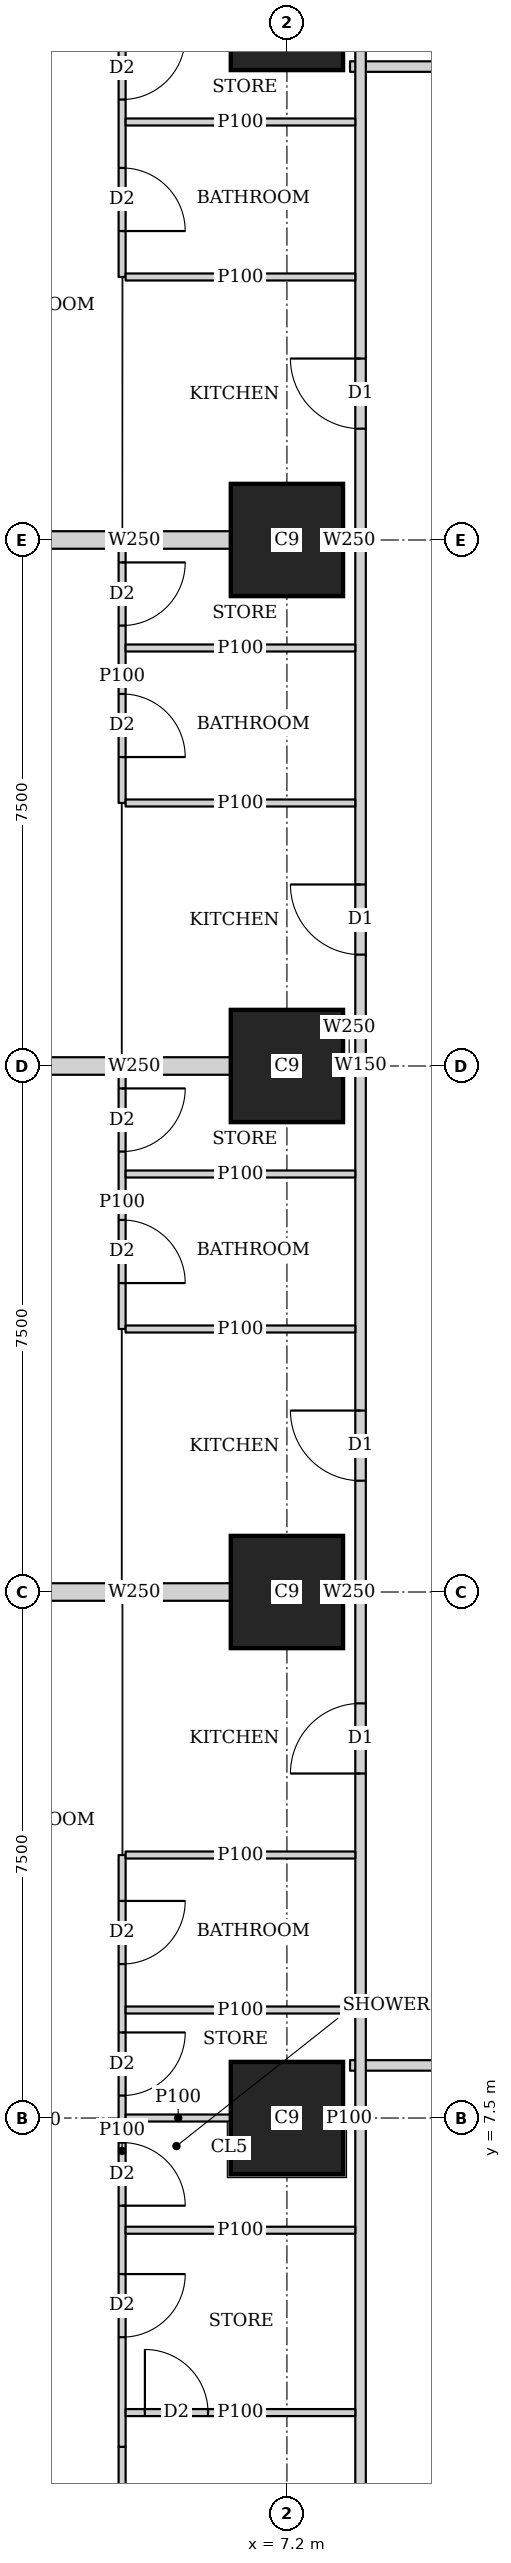
"""IFC4 building model, lengths in metres.
Left out: names, types, materials, properties, quantities, classifications, styles, units other than length and angle.
Written with IfcOpenShell. Run it as: python <this file> out.ifc"""

import sys

from ifc_helpers import new_model, si_unit, direction, frame, frame_2d, origin, origin_2d, place, context, subcontext, project, spatial, rectangle, extrude, element, fill, save


model = new_model("IFC4")
c1 = context("Model", 3, precision=1e-05, world=origin(), true_north=direction((0.0, 1.0)))
c2 = subcontext(c1, "Body", "Model", "MODEL_VIEW")
j1 = project(units=[si_unit("LENGTHUNIT", "METRE"), si_unit("PLANEANGLEUNIT", "RADIAN")], contexts=[c1])
p1 = place(None, origin())
s1 = spatial("IfcSite", under=j1, at=p1, CompositionType="ELEMENT")
p2 = place(p1, origin())
s2 = spatial("IfcBuilding", under=s1, at=p2, CompositionType="ELEMENT")
p3 = place(p2, frame((0.0, 0.0, 122.9)))
s3 = spatial("IfcBuildingStorey", under=s2, at=p3, CompositionType="ELEMENT", Elevation=122.9)
for number, where, z_axis, x_axis in (
    (1, (7.2, 7.5, 0.0), (0.0, 0.0, 1.0), (1.0, 0.0, 0.0)),
    (2, (7.2, 15.0, 0.0), (0.0, 0.0, 1.0), (1.0, 0.0, 0.0)),
    (3, (7.2, 22.5, 0.0), (0.0, 0.0, 1.0), (1.0, 0.0, 0.0)),
    (4, (7.2, 30.0, 0.0), (0.0, 0.0, 1.0), (1.0, 0.0, 0.0)),
    (5, (7.2, 37.5, 0.0), (0.0, 0.0, 1.0), (1.0, 0.0, 0.0)),
):
    element("IfcColumn", number, at=place(p3, frame(where, z_axis=z_axis, x_axis=x_axis)), inside=s3, PredefinedType="COLUMN", context=c2, shape_type="SweptSolid", body=[
        extrude(rectangle(XDim=1.6, YDim=1.6, at=origin_2d()), origin(), (0.0, 0.0, 1.0), 3.75),
    ])
p4 = place(p3, frame((8.25, 2.126, 0.0), z_axis=(0.0, 0.0, 1.0), x_axis=(0.0, 1.0, 0.0)))
e6 = element("IfcWall", 6, at=p4, inside=s3, PredefinedType="SOLIDWALL", context=c2, shape_type="SweptSolid", body=[
    extrude(rectangle(XDim=40.773, YDim=0.15, at=frame_2d((20.386, 0.0))), origin(), (0.0, 0.0, 1.0), 3.5),
])
p5 = place(p4, frame((10.286, 0.0, 0.0)))
e7 = element("IfcOpeningElement", 7, at=p5, cuts=e6, PredefinedType="OPENING", context=c2, shape_type="SweptSolid", body=[
    extrude(rectangle(XDim=1.0, YDim=2.1, at=frame_2d((0.5, 1.05))), frame((0.0, 0.085, 0.0), z_axis=(0.0, -1.0, 0.0), x_axis=(1.0, 0.0, 0.0)), (0.0, 0.0, 1.0), 0.17),
])
p6 = place(p4, frame((14.461, 0.0, 0.0)))
e8 = element("IfcOpeningElement", 8, at=p6, cuts=e6, PredefinedType="OPENING", context=c2, shape_type="SweptSolid", body=[
    extrude(rectangle(XDim=1.0, YDim=2.1, at=frame_2d((0.5, 1.05))), frame((0.0, 0.085, 0.0), z_axis=(0.0, -1.0, 0.0), x_axis=(1.0, 0.0, 0.0)), (0.0, 0.0, 1.0), 0.17),
])
p7 = place(p4, frame((21.962, 0.0, 0.0)))
e9 = element("IfcOpeningElement", 9, at=p7, cuts=e6, PredefinedType="OPENING", context=c2, shape_type="SweptSolid", body=[
    extrude(rectangle(XDim=1.0, YDim=2.1, at=frame_2d((0.5, 1.05))), frame((0.0, 0.085, 0.0), z_axis=(0.0, -1.0, 0.0), x_axis=(1.0, 0.0, 0.0)), (0.0, 0.0, 1.0), 0.17),
])
p8 = place(p4, frame((29.461, 0.0, 0.0)))
e10 = element("IfcOpeningElement", 10, at=p8, cuts=e6, PredefinedType="OPENING", context=c2, shape_type="SweptSolid", body=[
    extrude(rectangle(XDim=1.0, YDim=2.1, at=frame_2d((0.5, 1.05))), frame((0.0, 0.085, 0.0), z_axis=(0.0, -1.0, 0.0), x_axis=(1.0, 0.0, 0.0)), (0.0, 0.0, 1.0), 0.17),
])
p9 = place(p3, frame((13.599, 8.25, 0.0), z_axis=(0.0, 0.0, 1.0), x_axis=(-1.0, 0.0, 0.0)))
e11 = element("IfcWall", 11, at=p9, inside=s3, PredefinedType="SOLIDWALL", context=c2, shape_type="SweptSolid", body=[
    extrude(rectangle(XDim=5.499, YDim=0.15, at=frame_2d((2.75, 0.0))), origin(), (0.0, 0.0, 1.0), 3.5),
])
p10 = place(p9, frame((1.774, 0.0, 0.0)))
e12 = element("IfcOpeningElement", 12, at=p10, cuts=e11, PredefinedType="OPENING", context=c2, shape_type="SweptSolid", body=[
    extrude(rectangle(XDim=1.0, YDim=2.1, at=frame_2d((0.5, 1.05))), frame((0.0, 0.085, 0.0), z_axis=(0.0, -1.0, 0.0), x_axis=(1.0, 0.0, 0.0)), (0.0, 0.0, 1.0), 0.17),
])
p11 = place(p3, frame((8.1, 36.75, 0.0), z_axis=(0.0, 0.0, 1.0), x_axis=(1.0, 0.0, 0.0)))
e13 = element("IfcWall", 13, at=p11, inside=s3, PredefinedType="SOLIDWALL", context=c2, shape_type="SweptSolid", body=[
    extrude(rectangle(XDim=5.499, YDim=0.15, at=frame_2d((2.75, 0.0))), origin(), (0.0, 0.0, 1.0), 3.5),
])
p12 = place(p11, frame((2.725, 0.0, 0.0)))
e14 = element("IfcOpeningElement", 14, at=p12, cuts=e13, PredefinedType="OPENING", context=c2, shape_type="SweptSolid", body=[
    extrude(rectangle(XDim=1.0, YDim=2.1, at=frame_2d((0.5, 1.05))), frame((0.0, 0.085, 0.0), z_axis=(0.0, -1.0, 0.0), x_axis=(1.0, 0.0, 0.0)), (0.0, 0.0, 1.0), 0.17),
])
p13 = place(p3, frame((4.85, 0.326, 0.0), z_axis=(0.0, 0.0, 1.0), x_axis=(0.0, 1.0, 0.0)))
e15 = element("IfcWall", 15, at=p13, inside=s3, PredefinedType="PARTITIONING", context=c2, shape_type="SweptSolid", body=[
    extrude(rectangle(XDim=2.486, YDim=0.1, at=frame_2d((1.243, 0.0))), origin(), (0.0, 0.0, 1.0), 2.05),
])
p14 = place(p3, frame((4.85, 2.812, 0.0), z_axis=(0.0, 0.0, 1.0), x_axis=(0.0, 1.0, 0.0)))
e16 = element("IfcWall", 16, at=p14, inside=s3, PredefinedType="PARTITIONING", context=c2, shape_type="SweptSolid", body=[
    extrude(rectangle(XDim=8.438, YDim=0.1, at=frame_2d((4.219, 0.0))), origin(), (0.0, 0.0, 1.0), 3.5),
])
p15 = place(p14, frame((6.883, 0.0, 0.0)))
e17 = element("IfcOpeningElement", 17, at=p15, cuts=e16, PredefinedType="OPENING", context=c2, shape_type="SweptSolid", body=[
    extrude(rectangle(XDim=0.9, YDim=2.1, at=frame_2d((0.45, 1.05))), frame((0.0, 0.06, 0.0), z_axis=(0.0, -1.0, 0.0), x_axis=(1.0, 0.0, 0.0)), (0.0, 0.0, 1.0), 0.12),
])
p16 = place(p14, frame((3.438, 0.0, 0.0)))
e18 = element("IfcOpeningElement", 18, at=p16, cuts=e16, PredefinedType="OPENING", context=c2, shape_type="SweptSolid", body=[
    extrude(rectangle(XDim=0.9, YDim=2.1, at=frame_2d((0.45, 1.05))), frame((0.0, 0.06, 0.0), z_axis=(0.0, -1.0, 0.0), x_axis=(1.0, 0.0, 0.0)), (0.0, 0.0, 1.0), 0.12),
])
p17 = place(p14, frame((5.008, 0.0, 0.0)))
e19 = element("IfcOpeningElement", 19, at=p17, cuts=e16, PredefinedType="OPENING", context=c2, shape_type="SweptSolid", body=[
    extrude(rectangle(XDim=0.9, YDim=2.1, at=frame_2d((0.45, 1.05))), frame((0.0, 0.06, 0.0), z_axis=(0.0, -1.0, 0.0), x_axis=(1.0, 0.0, 0.0)), (0.0, 0.0, 1.0), 0.12),
])
p18 = place(p14, frame((1.563, 0.0, 0.0)))
e20 = element("IfcOpeningElement", 20, at=p18, cuts=e16, PredefinedType="OPENING", context=c2, shape_type="SweptSolid", body=[
    extrude(rectangle(XDim=0.9, YDim=2.1, at=frame_2d((0.45, 1.05))), frame((0.0, 0.06, 0.0), z_axis=(0.0, -1.0, 0.0), x_axis=(1.0, 0.0, 0.0)), (0.0, 0.0, 1.0), 0.12),
])
p19 = place(p3, frame((4.9, 7.5, 0.0), z_axis=(0.0, 0.0, 1.0), x_axis=(1.0, 0.0, 0.0)))
e21 = element("IfcWall", 21, at=p19, inside=s3, PredefinedType="PARTITIONING", context=c2, shape_type="SweptSolid", body=[
    extrude(rectangle(XDim=1.499, YDim=0.1, at=frame_2d((0.75, 0.0))), origin(), (0.0, 0.0, 1.0), 3.5),
])
p20 = place(p3, frame((8.001, 7.5, 0.0), z_axis=(0.0, 0.0, 1.0), x_axis=(1.0, 0.0, 0.0)))
e22 = element("IfcWall", 22, at=p20, inside=s3, PredefinedType="PARTITIONING", context=c2, shape_type="SweptSolid", body=[
    extrude(rectangle(XDim=0.174, YDim=0.1, at=frame_2d((0.087, 0.0))), origin(), (0.0, 0.0, 1.0), 3.5),
])
for number, where, z_axis, x_axis in (
    (23, (4.9, 11.25, 0.0), (0.0, 0.0, 1.0), (1.0, 0.0, 0.0)),
    (24, (4.9, 9.04, 0.0), (0.0, 0.0, 1.0), (1.0, 0.0, 0.0)),
    (25, (4.9, 5.9, 0.0), (0.0, 0.0, 1.0), (1.0, 0.0, 0.0)),
):
    element("IfcWall", number, at=place(p3, frame(where, z_axis=z_axis, x_axis=x_axis)), inside=s3, PredefinedType="PARTITIONING", context=c2, shape_type="SweptSolid", body=[
        extrude(rectangle(XDim=3.275, YDim=0.1, at=frame_2d((1.638, 0.0))), origin(), (0.0, 0.0, 1.0), 3.5),
    ])
p21 = place(p3, frame((4.85, 18.75, 0.0), z_axis=(0.0, 0.0, 1.0), x_axis=(0.0, 1.0, 0.0)))
e26 = element("IfcWall", 26, at=p21, inside=s3, PredefinedType="PARTITIONING", context=c2, shape_type="SweptSolid", body=[
    extrude(rectangle(XDim=3.625, YDim=0.1, at=frame_2d((1.812, 0.0))), origin(), (0.0, 0.0, 1.0), 3.5),
])
p22 = place(p21, frame((0.655, 0.0, 0.0)))
e27 = element("IfcOpeningElement", 27, at=p22, cuts=e26, PredefinedType="OPENING", context=c2, shape_type="SweptSolid", body=[
    extrude(rectangle(XDim=0.9, YDim=2.1, at=frame_2d((0.45, 1.05))), frame((0.0, 0.06, 0.0), z_axis=(0.0, -1.0, 0.0), x_axis=(1.0, 0.0, 0.0)), (0.0, 0.0, 1.0), 0.12),
])
p23 = place(p21, frame((2.53, 0.0, 0.0)))
e28 = element("IfcOpeningElement", 28, at=p23, cuts=e26, PredefinedType="OPENING", context=c2, shape_type="SweptSolid", body=[
    extrude(rectangle(XDim=0.9, YDim=2.1, at=frame_2d((0.45, 1.05))), frame((0.0, 0.06, 0.0), z_axis=(0.0, -1.0, 0.0), x_axis=(1.0, 0.0, 0.0)), (0.0, 0.0, 1.0), 0.12),
])
for number, where, z_axis, x_axis in (
    (29, (4.9, 18.75, 0.0), (0.0, 0.0, 1.0), (1.0, 0.0, 0.0)),
    (30, (4.9, 20.96, 0.0), (0.0, 0.0, 1.0), (1.0, 0.0, 0.0)),
):
    element("IfcWall", number, at=place(p3, frame(where, z_axis=z_axis, x_axis=x_axis)), inside=s3, PredefinedType="PARTITIONING", context=c2, shape_type="SweptSolid", body=[
        extrude(rectangle(XDim=3.275, YDim=0.1, at=frame_2d((1.638, 0.0))), origin(), (0.0, 0.0, 1.0), 3.5),
    ])
p24 = place(p3, frame((3.65, 15.0, 0.0), z_axis=(0.0, 0.0, 1.0), x_axis=(1.0, 0.0, 0.0)))
e31 = element("IfcWall", 31, at=p24, inside=s3, PredefinedType="SOLIDWALL", context=c2, shape_type="SweptSolid", body=[
    extrude(rectangle(XDim=2.749, YDim=0.25, at=frame_2d((1.375, 0.0))), origin(), (0.0, 0.0, 1.0), 3.5),
])
p25 = place(p3, frame((8.001, 15.0, 0.0), z_axis=(0.0, 0.0, 1.0), x_axis=(1.0, 0.0, 0.0)))
e32 = element("IfcWall", 32, at=p25, inside=s3, PredefinedType="SOLIDWALL", context=c2, shape_type="SweptSolid", body=[
    extrude(rectangle(XDim=0.174, YDim=0.25, at=frame_2d((0.087, 0.0))), origin(), (0.0, 0.0, 1.0), 3.5),
])
p26 = place(p3, frame((4.85, 26.25, 0.0), z_axis=(0.0, 0.0, 1.0), x_axis=(0.0, 1.0, 0.0)))
e33 = element("IfcWall", 33, at=p26, inside=s3, PredefinedType="PARTITIONING", context=c2, shape_type="SweptSolid", body=[
    extrude(rectangle(XDim=3.625, YDim=0.1, at=frame_2d((1.812, 0.0))), origin(), (0.0, 0.0, 1.0), 3.5),
])
p27 = place(p26, frame((0.655, 0.0, 0.0)))
e34 = element("IfcOpeningElement", 34, at=p27, cuts=e33, PredefinedType="OPENING", context=c2, shape_type="SweptSolid", body=[
    extrude(rectangle(XDim=0.9, YDim=2.1, at=frame_2d((0.45, 1.05))), frame((0.0, 0.06, 0.0), z_axis=(0.0, -1.0, 0.0), x_axis=(1.0, 0.0, 0.0)), (0.0, 0.0, 1.0), 0.12),
])
p28 = place(p26, frame((2.53, 0.0, 0.0)))
e35 = element("IfcOpeningElement", 35, at=p28, cuts=e33, PredefinedType="OPENING", context=c2, shape_type="SweptSolid", body=[
    extrude(rectangle(XDim=0.9, YDim=2.1, at=frame_2d((0.45, 1.05))), frame((0.0, 0.06, 0.0), z_axis=(0.0, -1.0, 0.0), x_axis=(1.0, 0.0, 0.0)), (0.0, 0.0, 1.0), 0.12),
])
for number, where, z_axis, x_axis in (
    (36, (4.9, 26.25, 0.0), (0.0, 0.0, 1.0), (1.0, 0.0, 0.0)),
    (37, (4.9, 28.46, 0.0), (0.0, 0.0, 1.0), (1.0, 0.0, 0.0)),
):
    element("IfcWall", number, at=place(p3, frame(where, z_axis=z_axis, x_axis=x_axis)), inside=s3, PredefinedType="PARTITIONING", context=c2, shape_type="SweptSolid", body=[
        extrude(rectangle(XDim=3.275, YDim=0.1, at=frame_2d((1.638, 0.0))), origin(), (0.0, 0.0, 1.0), 3.5),
    ])
p29 = place(p3, frame((3.65, 22.5, 0.0), z_axis=(0.0, 0.0, 1.0), x_axis=(1.0, 0.0, 0.0)))
e38 = element("IfcWall", 38, at=p29, inside=s3, PredefinedType="SOLIDWALL", context=c2, shape_type="SweptSolid", body=[
    extrude(rectangle(XDim=2.749, YDim=0.25, at=frame_2d((1.375, 0.0))), origin(), (0.0, 0.0, 1.0), 3.5),
])
p30 = place(p3, frame((8.001, 22.5, 0.0), z_axis=(0.0, 0.0, 1.0), x_axis=(1.0, 0.0, 0.0)))
e39 = element("IfcWall", 39, at=p30, inside=s3, PredefinedType="SOLIDWALL", context=c2, shape_type="SweptSolid", body=[
    extrude(rectangle(XDim=0.174, YDim=0.25, at=frame_2d((0.087, 0.0))), origin(), (0.0, 0.0, 1.0), 3.5),
])
p31 = place(p3, frame((4.85, 33.75, 0.0), z_axis=(0.0, 0.0, 1.0), x_axis=(0.0, 1.0, 0.0)))
e40 = element("IfcWall", 40, at=p31, inside=s3, PredefinedType="PARTITIONING", context=c2, shape_type="SweptSolid", body=[
    extrude(rectangle(XDim=8.449, YDim=0.1, at=frame_2d((4.225, 0.0))), origin(), (0.0, 0.0, 1.0), 3.5),
])
p32 = place(p31, frame((0.655, 0.0, 0.0)))
e41 = element("IfcOpeningElement", 41, at=p32, cuts=e40, PredefinedType="OPENING", context=c2, shape_type="SweptSolid", body=[
    extrude(rectangle(XDim=0.9, YDim=2.1, at=frame_2d((0.45, 1.05))), frame((0.0, 0.06, 0.0), z_axis=(0.0, -1.0, 0.0), x_axis=(1.0, 0.0, 0.0)), (0.0, 0.0, 1.0), 0.12),
])
p33 = place(p31, frame((4.1, 0.0, 0.0)))
e42 = element("IfcOpeningElement", 42, at=p33, cuts=e40, PredefinedType="OPENING", context=c2, shape_type="SweptSolid", body=[
    extrude(rectangle(XDim=0.9, YDim=2.1, at=frame_2d((0.45, 1.05))), frame((0.0, 0.06, 0.0), z_axis=(0.0, -1.0, 0.0), x_axis=(1.0, 0.0, 0.0)), (0.0, 0.0, 1.0), 0.12),
])
p34 = place(p31, frame((2.53, 0.0, 0.0)))
e43 = element("IfcOpeningElement", 43, at=p34, cuts=e40, PredefinedType="OPENING", context=c2, shape_type="SweptSolid", body=[
    extrude(rectangle(XDim=0.9, YDim=2.1, at=frame_2d((0.45, 1.05))), frame((0.0, 0.06, 0.0), z_axis=(0.0, -1.0, 0.0), x_axis=(1.0, 0.0, 0.0)), (0.0, 0.0, 1.0), 0.12),
])
p35 = place(p31, frame((5.975, 0.0, 0.0)))
e44 = element("IfcOpeningElement", 44, at=p35, cuts=e40, PredefinedType="OPENING", context=c2, shape_type="SweptSolid", body=[
    extrude(rectangle(XDim=0.9, YDim=2.1, at=frame_2d((0.45, 1.05))), frame((0.0, 0.06, 0.0), z_axis=(0.0, -1.0, 0.0), x_axis=(1.0, 0.0, 0.0)), (0.0, 0.0, 1.0), 0.12),
])
for number, where, z_axis, x_axis in (
    (45, (4.9, 33.75, 0.0), (0.0, 0.0, 1.0), (1.0, 0.0, 0.0)),
    (46, (4.9, 35.96, 0.0), (0.0, 0.0, 1.0), (1.0, 0.0, 0.0)),
):
    element("IfcWall", number, at=place(p3, frame(where, z_axis=z_axis, x_axis=x_axis)), inside=s3, PredefinedType="PARTITIONING", context=c2, shape_type="SweptSolid", body=[
        extrude(rectangle(XDim=3.275, YDim=0.1, at=frame_2d((1.638, 0.0))), origin(), (0.0, 0.0, 1.0), 3.5),
    ])
p36 = place(p3, frame((3.65, 30.0, 0.0), z_axis=(0.0, 0.0, 1.0), x_axis=(1.0, 0.0, 0.0)))
e47 = element("IfcWall", 47, at=p36, inside=s3, PredefinedType="SOLIDWALL", context=c2, shape_type="SweptSolid", body=[
    extrude(rectangle(XDim=2.749, YDim=0.25, at=frame_2d((1.375, 0.0))), origin(), (0.0, 0.0, 1.0), 3.5),
])
p37 = place(p3, frame((8.001, 30.0, 0.0), z_axis=(0.0, 0.0, 1.0), x_axis=(1.0, 0.0, 0.0)))
e48 = element("IfcWall", 48, at=p37, inside=s3, PredefinedType="SOLIDWALL", context=c2, shape_type="SweptSolid", body=[
    extrude(rectangle(XDim=0.174, YDim=0.25, at=frame_2d((0.087, 0.0))), origin(), (0.0, 0.0, 1.0), 3.5),
])
p38 = place(p3, frame((8.175, 3.3, 0.0), z_axis=(0.0, 0.0, 1.0), x_axis=(-1.0, 0.0, 0.0)))
e49 = element("IfcWall", 49, at=p38, inside=s3, PredefinedType="PARTITIONING", context=c2, shape_type="SweptSolid", body=[
    extrude(rectangle(XDim=3.275, YDim=0.1, at=frame_2d((1.638, 0.0))), origin(), (0.0, 0.0, 1.0), 3.5),
])
p39 = place(p38, frame((2.1, 0.0, 0.0)))
e50 = element("IfcOpeningElement", 50, at=p39, cuts=e49, PredefinedType="OPENING", context=c2, shape_type="SweptSolid", body=[
    extrude(rectangle(XDim=0.9, YDim=2.1, at=frame_2d((0.45, 1.05))), frame((0.0, 0.06, 0.0), z_axis=(0.0, -1.0, 0.0), x_axis=(1.0, 0.0, 0.0)), (0.0, 0.0, 1.0), 0.12),
])
p40 = place(p15, origin())
e51 = element("IfcDoor", 51, at=p40, inside=s3, OperationType="SINGLE_SWING_LEFT", PredefinedType="DOOR", context=c2, shape_type="SweptSolid", body=[
    extrude(rectangle(XDim=0.9, YDim=2.1, at=frame_2d((0.45, 1.05))), frame((0.0, 0.025, 0.0), z_axis=(0.0, -1.0, 0.0), x_axis=(1.0, 0.0, 0.0)), (0.0, 0.0, 1.0), 0.05),
])
fill(e17, e51)
p41 = place(p16, origin())
e52 = element("IfcDoor", 52, at=p41, inside=s3, OperationType="SINGLE_SWING_RIGHT", PredefinedType="DOOR", context=c2, shape_type="SweptSolid", body=[
    extrude(rectangle(XDim=0.9, YDim=2.1, at=frame_2d((0.45, 1.05))), frame((0.0, 0.025, 0.0), z_axis=(0.0, -1.0, 0.0), x_axis=(1.0, 0.0, 0.0)), (0.0, 0.0, 1.0), 0.05),
])
fill(e18, e52)
p42 = place(p17, origin())
e53 = element("IfcDoor", 53, at=p42, inside=s3, OperationType="SINGLE_SWING_LEFT", PredefinedType="DOOR", context=c2, shape_type="SweptSolid", body=[
    extrude(rectangle(XDim=0.9, YDim=2.1, at=frame_2d((0.45, 1.05))), frame((0.0, 0.025, 0.0), z_axis=(0.0, -1.0, 0.0), x_axis=(1.0, 0.0, 0.0)), (0.0, 0.0, 1.0), 0.05),
])
fill(e19, e53)
p43 = place(p18, origin())
e54 = element("IfcDoor", 54, at=p43, inside=s3, OperationType="SINGLE_SWING_LEFT", PredefinedType="DOOR", context=c2, shape_type="SweptSolid", body=[
    extrude(rectangle(XDim=0.9, YDim=2.1, at=frame_2d((0.45, 1.05))), frame((0.0, 0.025, 0.0), z_axis=(0.0, -1.0, 0.0), x_axis=(1.0, 0.0, 0.0)), (0.0, 0.0, 1.0), 0.05),
])
fill(e20, e54)
p44 = place(p5, origin())
e55 = element("IfcDoor", 55, at=p44, inside=s3, OperationType="SINGLE_SWING_LEFT", PredefinedType="DOOR", context=c2, shape_type="SweptSolid", body=[
    extrude(rectangle(XDim=1.0, YDim=2.1, at=frame_2d((0.5, 1.05))), frame((0.0, 0.025, 0.0), z_axis=(0.0, -1.0, 0.0), x_axis=(1.0, 0.0, 0.0)), (0.0, 0.0, 1.0), 0.05),
])
fill(e7, e55)
p45 = place(p22, origin())
e56 = element("IfcDoor", 56, at=p45, inside=s3, OperationType="SINGLE_SWING_RIGHT", PredefinedType="DOOR", context=c2, shape_type="SweptSolid", body=[
    extrude(rectangle(XDim=0.9, YDim=2.1, at=frame_2d((0.45, 1.05))), frame((0.0, 0.025, 0.0), z_axis=(0.0, -1.0, 0.0), x_axis=(1.0, 0.0, 0.0)), (0.0, 0.0, 1.0), 0.05),
])
fill(e27, e56)
p46 = place(p23, origin())
e57 = element("IfcDoor", 57, at=p46, inside=s3, OperationType="SINGLE_SWING_LEFT", PredefinedType="DOOR", context=c2, shape_type="SweptSolid", body=[
    extrude(rectangle(XDim=0.9, YDim=2.1, at=frame_2d((0.45, 1.05))), frame((0.0, 0.025, 0.0), z_axis=(0.0, -1.0, 0.0), x_axis=(1.0, 0.0, 0.0)), (0.0, 0.0, 1.0), 0.05),
])
fill(e28, e57)
p47 = place(p6, origin())
e58 = element("IfcDoor", 58, at=p47, inside=s3, OperationType="SINGLE_SWING_RIGHT", PredefinedType="DOOR", context=c2, shape_type="SweptSolid", body=[
    extrude(rectangle(XDim=1.0, YDim=2.1, at=frame_2d((0.5, 1.05))), frame((0.0, 0.025, 0.0), z_axis=(0.0, -1.0, 0.0), x_axis=(1.0, 0.0, 0.0)), (0.0, 0.0, 1.0), 0.05),
])
fill(e8, e58)
p48 = place(p27, origin())
e59 = element("IfcDoor", 59, at=p48, inside=s3, OperationType="SINGLE_SWING_RIGHT", PredefinedType="DOOR", context=c2, shape_type="SweptSolid", body=[
    extrude(rectangle(XDim=0.9, YDim=2.1, at=frame_2d((0.45, 1.05))), frame((0.0, 0.025, 0.0), z_axis=(0.0, -1.0, 0.0), x_axis=(1.0, 0.0, 0.0)), (0.0, 0.0, 1.0), 0.05),
])
fill(e34, e59)
p49 = place(p28, origin())
e60 = element("IfcDoor", 60, at=p49, inside=s3, OperationType="SINGLE_SWING_LEFT", PredefinedType="DOOR", context=c2, shape_type="SweptSolid", body=[
    extrude(rectangle(XDim=0.9, YDim=2.1, at=frame_2d((0.45, 1.05))), frame((0.0, 0.025, 0.0), z_axis=(0.0, -1.0, 0.0), x_axis=(1.0, 0.0, 0.0)), (0.0, 0.0, 1.0), 0.05),
])
fill(e35, e60)
p50 = place(p7, origin())
e61 = element("IfcDoor", 61, at=p50, inside=s3, OperationType="SINGLE_SWING_RIGHT", PredefinedType="DOOR", context=c2, shape_type="SweptSolid", body=[
    extrude(rectangle(XDim=1.0, YDim=2.1, at=frame_2d((0.5, 1.05))), frame((0.0, 0.025, 0.0), z_axis=(0.0, -1.0, 0.0), x_axis=(1.0, 0.0, 0.0)), (0.0, 0.0, 1.0), 0.05),
])
fill(e9, e61)
p51 = place(p32, origin())
e62 = element("IfcDoor", 62, at=p51, inside=s3, OperationType="SINGLE_SWING_RIGHT", PredefinedType="DOOR", context=c2, shape_type="SweptSolid", body=[
    extrude(rectangle(XDim=0.9, YDim=2.1, at=frame_2d((0.45, 1.05))), frame((0.0, 0.025, 0.0), z_axis=(0.0, -1.0, 0.0), x_axis=(1.0, 0.0, 0.0)), (0.0, 0.0, 1.0), 0.05),
])
fill(e41, e62)
p52 = place(p34, origin())
e63 = element("IfcDoor", 63, at=p52, inside=s3, OperationType="SINGLE_SWING_LEFT", PredefinedType="DOOR", context=c2, shape_type="SweptSolid", body=[
    extrude(rectangle(XDim=0.9, YDim=2.1, at=frame_2d((0.45, 1.05))), frame((0.0, 0.025, 0.0), z_axis=(0.0, -1.0, 0.0), x_axis=(1.0, 0.0, 0.0)), (0.0, 0.0, 1.0), 0.05),
])
fill(e43, e63)
p53 = place(p8, origin())
e64 = element("IfcDoor", 64, at=p53, inside=s3, OperationType="SINGLE_SWING_RIGHT", PredefinedType="DOOR", context=c2, shape_type="SweptSolid", body=[
    extrude(rectangle(XDim=1.0, YDim=2.1, at=frame_2d((0.5, 1.05))), frame((0.0, 0.025, 0.0), z_axis=(0.0, -1.0, 0.0), x_axis=(1.0, 0.0, 0.0)), (0.0, 0.0, 1.0), 0.05),
])
fill(e10, e64)
p54 = place(p39, origin())
e65 = element("IfcDoor", 65, at=p54, inside=s3, OperationType="SINGLE_SWING_LEFT", PredefinedType="DOOR", context=c2, shape_type="SweptSolid", body=[
    extrude(rectangle(XDim=0.9, YDim=2.1, at=frame_2d((0.45, 1.05))), frame((0.0, 0.025, 0.0), z_axis=(0.0, -1.0, 0.0), x_axis=(1.0, 0.0, 0.0)), (0.0, 0.0, 1.0), 0.05),
])
fill(e50, e65)
save(model, sys.argv[1])
